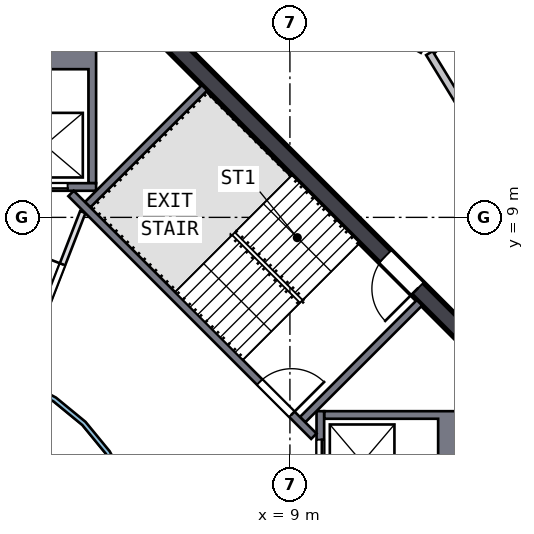
"""IFC4 building model, lengths in metres.
Left out: names, types, materials, properties, quantities, classifications, styles, units other than length and angle.
Written with IfcOpenShell. Run it as: python <this file> out.ifc"""

import sys

from ifc_helpers import new_model, si_unit, direction, frame, frame_2d, origin, place, context, subcontext, project, spatial, polyline, rectangle, outline, extrude, element, fill, save


model = new_model("IFC4")
c1 = context("Model", 3, precision=1e-05, world=origin(), true_north=direction((0.0, 1.0)))
c2 = subcontext(c1, "Body", "Model", "MODEL_VIEW")
j1 = project(units=[si_unit("LENGTHUNIT", "METRE"), si_unit("PLANEANGLEUNIT", "RADIAN")], contexts=[c1])
p1 = place(None, origin())
s1 = spatial("IfcSite", under=j1, at=p1, CompositionType="ELEMENT")
p2 = place(p1, origin())
s2 = spatial("IfcBuilding", under=s1, at=p2, CompositionType="ELEMENT")
p3 = place(p2, frame((0.0, 0.0, 284.5)))
s3 = spatial("IfcBuildingStorey", under=s2, at=p3, CompositionType="ELEMENT", Elevation=284.5)
p4 = place(p3, frame((13.841, 5.64, 0.0), z_axis=(0.0, 0.0, 1.0), x_axis=(-0.707106781, 0.707106781, 0.0)))
e1 = element("IfcWall", 1, at=p4, inside=s3, PredefinedType="SHEAR", context=c2, shape_type="SweptSolid", body=[
    extrude(rectangle(XDim=11.598, YDim=0.45, at=frame_2d((5.799, 0.0))), origin(), (0.0, 0.0, 1.0), 3.5),
])
p5 = place(p4, frame((2.099, 0.0, 0.0)))
e2 = element("IfcOpeningElement", 2, at=p5, cuts=e1, PredefinedType="OPENING", context=c2, shape_type="SweptSolid", body=[
    extrude(rectangle(XDim=1.2, YDim=2.1, at=frame_2d((0.6, 1.05))), frame((0.0, 0.235, 0.0), z_axis=(0.0, -1.0, 0.0), x_axis=(1.0, 0.0, 0.0)), (0.0, 0.0, 1.0), 0.47),
])
p6 = place(p3, origin())
e3 = element("IfcWall", 3, at=p6, inside=s3, PredefinedType="SOLIDWALL", context=c2, shape_type="SweptSolid", body=[
    extrude(outline(polyline([(13.55, 3.9), (13.55, 1.2), (9.9, 1.2), (9.9, 1.4), (12.9, 1.4), (12.9, 3.7), (9.9, 3.7), (9.9, 3.9), (13.55, 3.9)])), origin(), (0.0, 0.0, 1.0), 3.19),
])
p7 = place(p3, frame((9.8, 1.2, 0.0), z_axis=(0.0, 0.0, 1.0), x_axis=(0.0, 1.0, 0.0)))
e4 = element("IfcWall", 4, at=p7, inside=s3, PredefinedType="SOLIDWALL", context=c2, shape_type="SweptSolid", body=[
    extrude(rectangle(XDim=2.7, YDim=0.2, at=frame_2d((1.35, 0.0))), origin(), (0.0, 0.0, 1.0), 3.19),
])
p8 = place(p7, frame((0.75, 0.0, 0.0)))
e5 = element("IfcOpeningElement", 5, at=p8, cuts=e4, PredefinedType="OPENING", context=c2, shape_type="SweptSolid", body=[
    extrude(rectangle(XDim=1.2, YDim=2.1, at=frame_2d((0.6, 1.05))), frame((0.0, 0.11, 0.0), z_axis=(0.0, -1.0, 0.0), x_axis=(1.0, 0.0, 0.0)), (0.0, 0.0, 1.0), 0.22),
])
p9 = place(p3, origin())
e6 = element("IfcWall", 6, at=p9, inside=s3, PredefinedType="SOLIDWALL", context=c2, shape_type="SweptSolid", body=[
    extrude(outline(polyline([(3.9, 9.9), (3.7, 9.9), (3.7, 12.9), (1.4, 12.9), (1.4, 9.9), (1.2, 9.9), (1.2, 13.55), (3.9, 13.55), (3.9, 9.9)])), origin(), (0.0, 0.0, 1.0), 3.19),
])
p10 = place(p3, frame((1.2, 9.8, 0.0), z_axis=(0.0, 0.0, 1.0), x_axis=(1.0, 0.0, 0.0)))
e7 = element("IfcWall", 7, at=p10, inside=s3, PredefinedType="SOLIDWALL", context=c2, shape_type="SweptSolid", body=[
    extrude(rectangle(XDim=2.7, YDim=0.2, at=frame_2d((1.35, 0.0))), origin(), (0.0, 0.0, 1.0), 3.19),
])
p11 = place(p10, frame((0.75, 0.0, 0.0)))
e8 = element("IfcOpeningElement", 8, at=p11, cuts=e7, PredefinedType="OPENING", context=c2, shape_type="SweptSolid", body=[
    extrude(rectangle(XDim=1.2, YDim=2.1, at=frame_2d((0.6, 1.05))), frame((0.0, 0.11, 0.0), z_axis=(0.0, -1.0, 0.0), x_axis=(1.0, 0.0, 0.0)), (0.0, 0.0, 1.0), 0.22),
])
p12 = place(p3, frame((3.24, 9.629, 0.0), z_axis=(0.0, 0.0, 1.0), x_axis=(0.707106781, -0.707106781, 0.0)))
e9 = element("IfcWall", 9, at=p12, inside=s3, PredefinedType="SOLIDWALL", context=c2, shape_type="SweptSolid", body=[
    extrude(rectangle(XDim=9.036, YDim=0.2, at=frame_2d((4.518, 0.0))), origin(), (0.0, 0.0, 1.0), 3.19),
])
p13 = place(p12, frame((7.018, 0.0, 0.0)))
e10 = element("IfcOpeningElement", 10, at=p13, cuts=e9, PredefinedType="OPENING", context=c2, shape_type="SweptSolid", body=[
    extrude(rectangle(XDim=1.2, YDim=2.1, at=frame_2d((0.6, 1.05))), frame((0.0, 0.11, 0.0), z_axis=(0.0, -1.0, 0.0), x_axis=(1.0, 0.0, 0.0)), (0.0, 0.0, 1.0), 0.22),
])
for number, where, z_axis, x_axis in (
    (11, (9.334, 3.677, 0.0), (0.0, 0.0, 1.0), (0.707, 0.707, 0.0)),
    (12, (3.677, 9.334, 0.0), (0.0, 0.0, 1.0), (0.707, 0.707, 0.0)),
):
    element("IfcWall", number, at=place(p3, frame(where, z_axis=z_axis, x_axis=x_axis)), inside=s3, PredefinedType="SOLIDWALL", context=c2, shape_type="SweptSolid", body=[
        extrude(rectangle(XDim=4.35, YDim=0.2, at=frame_2d((2.175, 0.0))), origin(), (0.0, 0.0, 1.0), 3.19),
    ])
p14 = place(p3, frame((1.857, 4.782, 0.0), z_axis=(0.0, 0.0, 1.0), x_axis=(0.36202798, 0.932167228, 0.0)))
e13 = element("IfcWall", 13, at=p14, inside=s3, PredefinedType="PARTITIONING", context=c2, shape_type="SweptSolid", body=[
    extrude(rectangle(XDim=4.676, YDim=0.15, at=frame_2d((2.338, 0.0))), origin(), (0.0, 0.0, 1.0), 3.19),
])
p15 = place(p14, frame((1.4, 0.0, 0.0)))
e14 = element("IfcOpeningElement", 14, at=p15, cuts=e13, PredefinedType="OPENING", context=c2, shape_type="SweptSolid", body=[
    extrude(rectangle(XDim=1.8, YDim=2.1, at=frame_2d((0.9, 1.05))), frame((0.0, 0.085, 0.0), z_axis=(0.0, -1.0, 0.0), x_axis=(1.0, 0.0, 0.0)), (0.0, 0.0, 1.0), 0.17),
])
p16 = place(p3, origin())
e15 = element("IfcWall", 15, at=p16, inside=s3, PredefinedType="SOLIDWALL", context=c2, shape_type="SweptSolid", body=[
    extrude(outline(polyline([(5.021, -0.999), (4.73, -1.959), (4.257, -2.844), (3.62, -3.62), (2.844, -4.257), (1.959, -4.73), (0.999, -5.021), (0.0, -5.12), (-0.999, -5.021), (-1.959, -4.73), (-2.844, -4.257), (-3.62, -3.62), (-4.257, -2.844), (-4.73, -1.959), (-5.021, -0.999), (-5.12, 0.0), (-5.021, 0.999), (-4.73, 1.959), (-4.257, 2.844), (-3.62, 3.62), (-2.844, 4.257), (-1.959, 4.73), (-0.999, 5.021), (0.0, 5.12), (0.999, 5.021), (1.959, 4.73), (2.844, 4.257), (3.62, 3.62), (4.257, 2.844), (4.73, 1.959), (5.021, 0.999), (5.12, 0.0), (5.021, -0.999)]), holes=[polyline([(4.904, 0.976), (4.619, 1.913), (4.157, 2.778), (3.535, 3.535), (2.778, 4.157), (1.913, 4.619), (0.976, 4.904), (0.0, 5.0), (-0.976, 4.904), (-1.913, 4.619), (-2.778, 4.157), (-3.535, 3.535), (-4.157, 2.778), (-4.619, 1.913), (-4.904, 0.976), (-5.0, 0.0), (-4.904, -0.976), (-4.619, -1.913), (-4.157, -2.778), (-3.535, -3.535), (-2.778, -4.157), (-1.913, -4.619), (-0.976, -4.904), (0.0, -5.0), (0.976, -4.904), (1.913, -4.619), (2.778, -4.157), (3.535, -3.535), (4.157, -2.778), (4.619, -1.913), (4.904, -0.976), (5.0, 0.0), (4.904, 0.976)])]), origin(), (0.0, 0.0, 1.0), 3.19),
])
p17 = place(p3, frame((4.311, 17.872, 0.0), z_axis=(0.0, 0.0, 1.0), x_axis=(0.87831385, -0.478084491, 0.0)))
e16 = element("IfcWall", 16, at=p17, inside=s3, PredefinedType="SOLIDWALL", context=c2, shape_type="SweptSolid", body=[
    extrude(rectangle(XDim=9.317, YDim=0.2, at=frame_2d((4.658, 0.0))), origin(), (0.0, 0.0, 1.0), 3.19),
])
p18 = place(p17, frame((1.9, 0.0, 0.0)))
e17 = element("IfcOpeningElement", 17, at=p18, cuts=e16, PredefinedType="OPENING", context=c2, shape_type="SweptSolid", body=[
    extrude(rectangle(XDim=1.0, YDim=2.1, at=frame_2d((0.5, 1.05))), frame((0.0, 0.11, 0.0), z_axis=(0.0, -1.0, 0.0), x_axis=(1.0, 0.0, 0.0)), (0.0, 0.0, 1.0), 0.22),
])
p19 = place(p3, frame((12.669, 13.323, 0.0), z_axis=(0.0, 0.0, 1.0), x_axis=(0.521611117, -0.853183358, 0.0)))
e18 = element("IfcWall", 18, at=p19, inside=s3, PredefinedType="SOLIDWALL", context=c2, shape_type="SweptSolid", body=[
    extrude(rectangle(XDim=9.317, YDim=0.2, at=frame_2d((4.658, 0.0))), origin(), (0.0, 0.0, 1.0), 3.19),
])
p20 = place(p19, frame((3.865, 0.0, 0.0)))
e19 = element("IfcOpeningElement", 19, at=p20, cuts=e18, PredefinedType="OPENING", context=c2, shape_type="SweptSolid", body=[
    extrude(rectangle(XDim=1.8, YDim=2.1, at=frame_2d((0.9, 1.05))), frame((0.0, 0.11, 0.0), z_axis=(0.0, -1.0, 0.0), x_axis=(1.0, 0.0, 0.0)), (0.0, 0.0, 1.0), 0.22),
])
p21 = place(p3, frame((12.74, 13.398, 0.0), z_axis=(0.0, 0.0, 1.0), x_axis=(0.689136029, 0.724631998, 0.0)))
e20 = element("IfcWall", 20, at=p21, inside=s3, PredefinedType="SOLIDWALL", context=c2, shape_type="SweptSolid", body=[
    extrude(rectangle(XDim=3.418, YDim=0.2, at=frame_2d((1.709, 0.0))), origin(), (0.0, 0.0, 1.0), 3.19),
])
p22 = place(p8, origin())
e21 = element("IfcDoor", 21, at=p22, inside=s3, OperationType="DOUBLE_DOOR_SLIDING", PredefinedType="DOOR", context=c2, shape_type="SweptSolid", body=[
    extrude(rectangle(XDim=1.2, YDim=2.1, at=frame_2d((0.6, 1.05))), frame((0.0, 0.025, 0.0), z_axis=(0.0, -1.0, 0.0), x_axis=(1.0, 0.0, 0.0)), (0.0, 0.0, 1.0), 0.05),
])
fill(e5, e21)
p23 = place(p11, origin())
e22 = element("IfcDoor", 22, at=p23, inside=s3, OperationType="DOUBLE_DOOR_SLIDING", PredefinedType="DOOR", context=c2, shape_type="SweptSolid", body=[
    extrude(rectangle(XDim=1.2, YDim=2.1, at=frame_2d((0.6, 1.05))), frame((0.0, 0.025, 0.0), z_axis=(0.0, -1.0, 0.0), x_axis=(1.0, 0.0, 0.0)), (0.0, 0.0, 1.0), 0.05),
])
fill(e8, e22)
p24 = place(p13, origin())
e23 = element("IfcDoor", 23, at=p24, inside=s3, OperationType="SINGLE_SWING_RIGHT", PredefinedType="DOOR", context=c2, shape_type="SweptSolid", body=[
    extrude(rectangle(XDim=1.2, YDim=2.1, at=frame_2d((0.6, 1.05))), frame((0.0, 0.025, 0.0), z_axis=(0.0, -1.0, 0.0), x_axis=(1.0, 0.0, 0.0)), (0.0, 0.0, 1.0), 0.05),
])
fill(e10, e23)
p25 = place(p5, origin())
e24 = element("IfcDoor", 24, at=p25, inside=s3, OperationType="SINGLE_SWING_LEFT", PredefinedType="DOOR", context=c2, shape_type="SweptSolid", body=[
    extrude(rectangle(XDim=1.2, YDim=2.1, at=frame_2d((0.6, 1.05))), frame((0.0, 0.025, 0.0), z_axis=(0.0, -1.0, 0.0), x_axis=(1.0, 0.0, 0.0)), (0.0, 0.0, 1.0), 0.05),
])
fill(e2, e24)
p26 = place(p15, origin())
e25 = element("IfcDoor", 25, at=p26, inside=s3, OperationType="DOUBLE_DOOR_SINGLE_SWING", PredefinedType="DOOR", context=c2, shape_type="SweptSolid", body=[
    extrude(rectangle(XDim=1.8, YDim=2.1, at=frame_2d((0.9, 1.05))), frame((0.0, 0.025, 0.0), z_axis=(0.0, -1.0, 0.0), x_axis=(1.0, 0.0, 0.0)), (0.0, 0.0, 1.0), 0.05),
])
fill(e14, e25)
save(model, sys.argv[1])
